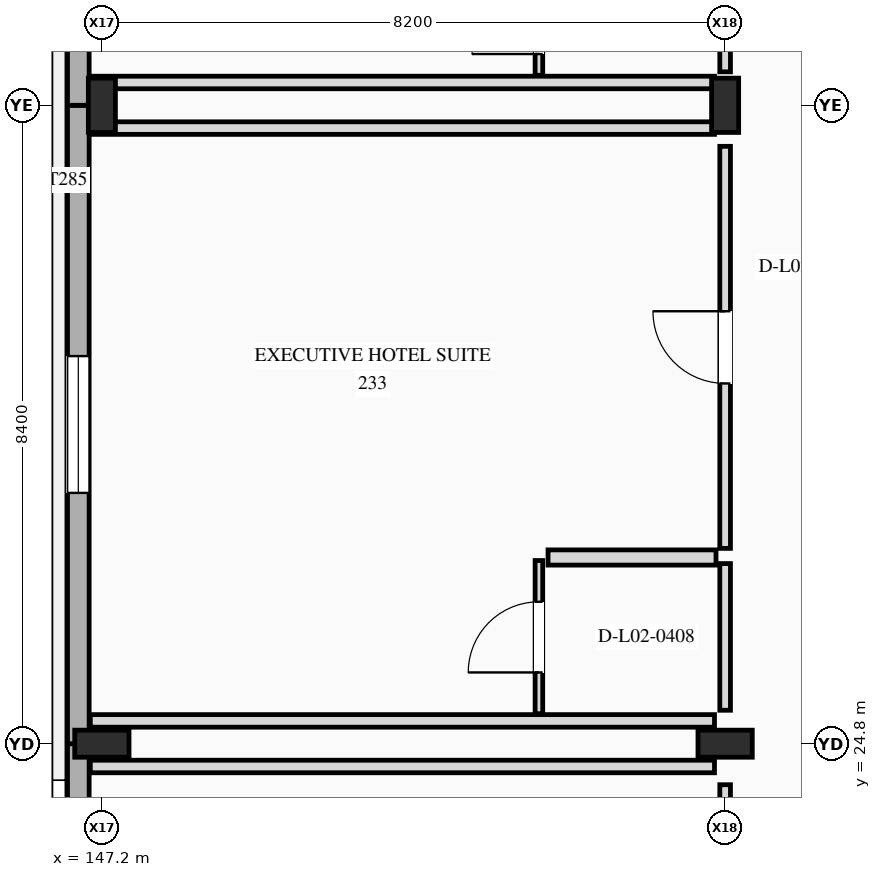
"""IFC4 building model, lengths in metres.
Left out: names, types, materials, properties, quantities, classifications, styles, units other than length and angle.
Written with IfcOpenShell. Run it as: python <this file> out.ifc"""

import sys

from ifc_helpers import new_model, si_unit, direction, frame, frame_2d, origin, origin_2d, place, context, subcontext, project, spatial, rectangle, i_section, extrude, element, fill, save


model = new_model("IFC4")
c1 = context("Model", 3, precision=1e-05, world=origin(), true_north=direction((0.0, 1.0)))
c2 = subcontext(c1, "Body", "Model", "MODEL_VIEW")
j1 = project(units=[si_unit("LENGTHUNIT", "METRE"), si_unit("PLANEANGLEUNIT", "RADIAN")], contexts=[c1])
p1 = place(None, origin())
s1 = spatial("IfcSite", under=j1, at=p1, CompositionType="ELEMENT")
p2 = place(p1, origin())
s2 = spatial("IfcBuilding", under=s1, at=p2, CompositionType="ELEMENT")
p3 = place(p2, frame((0.0, 0.0, 10.8)))
s3 = spatial("IfcBuildingStorey", under=s2, at=p3, CompositionType="ELEMENT", Elevation=10.8)
for number, where, z_axis, x_axis in (
    (1, (147.2, 24.8, 0.0), (0.0, 0.0, 1.0), (0.0, 1.0, 0.0)),
    (2, (147.2, 33.2, 0.0), (0.0, 0.0, 1.0), (1.0, 0.0, 0.0)),
    (3, (155.4, 24.8, 0.0), (0.0, 0.0, 1.0), (0.0, 1.0, 0.0)),
    (4, (155.4, 33.2, 0.0), (0.0, 0.0, 1.0), (1.0, 0.0, 0.0)),
):
    element("IfcColumn", number, at=place(p3, frame(where, z_axis=z_axis, x_axis=x_axis)), inside=s3, PredefinedType="COLUMN", context=c2, shape_type="SweptSolid", body=[
        extrude(i_section(OverallWidth=0.356, OverallDepth=0.714, WebThickness=0.019, FlangeThickness=0.034, at=origin_2d()), origin(), (0.0, 0.0, 1.0), 4.8),
    ])
p4 = place(p3, frame((146.89, 19.254, 0.0), z_axis=(0.0, 0.0, 1.0), x_axis=(0.0, 1.0, 0.0)))
e5 = element("IfcWall", 5, at=p4, inside=s3, PredefinedType="STANDARD", context=c2, shape_type="SweptSolid", body=[
    extrude(rectangle(XDim=5.546, YDim=0.285, at=frame_2d((2.773, 0.0))), origin(), (0.0, 0.0, 1.0), 4.8),
])
p5 = place(p4, frame((2.048, 0.0, 0.85)))
e6 = element("IfcOpeningElement", 6, at=p5, cuts=e5, PredefinedType="OPENING", context=c2, shape_type="SweptSolid", body=[
    extrude(rectangle(XDim=1.1, YDim=1.5, at=frame_2d((0.55, 0.75))), frame((0.0, 0.152, 0.0), z_axis=(0.0, -1.0, 0.0), x_axis=(1.0, 0.0, 0.0)), (0.0, 0.0, 1.0), 0.305),
])
p6 = place(p3, frame((146.89, 24.8, 0.0), z_axis=(0.0, 0.0, 1.0), x_axis=(0.0, 1.0, 0.0)))
e7 = element("IfcWall", 7, at=p6, inside=s3, PredefinedType="STANDARD", context=c2, shape_type="SweptSolid", body=[
    extrude(rectangle(XDim=8.4, YDim=0.285, at=frame_2d((4.2, 0.0))), origin(), (0.0, 0.0, 1.0), 4.8),
])
p7 = place(p6, frame((3.3, 0.0, 0.85)))
e8 = element("IfcOpeningElement", 8, at=p7, cuts=e7, PredefinedType="OPENING", context=c2, shape_type="SweptSolid", body=[
    extrude(rectangle(XDim=1.8, YDim=1.8, at=frame_2d((0.9, 0.9))), frame((0.0, 0.152, 0.0), z_axis=(0.0, -1.0, 0.0), x_axis=(1.0, 0.0, 0.0)), (0.0, 0.0, 1.0), 0.305),
])
p8 = place(p3, frame((146.89, 33.2, 0.0), z_axis=(0.0, 0.0, 1.0), x_axis=(0.0, 1.0, 0.0)))
e9 = element("IfcWall", 9, at=p8, inside=s3, PredefinedType="STANDARD", context=c2, shape_type="SweptSolid", body=[
    extrude(rectangle(XDim=8.4, YDim=0.285, at=frame_2d((4.2, 0.0))), origin(), (0.0, 0.0, 1.0), 4.8),
])
p9 = place(p3, frame((155.4, 21.37, 0.0), z_axis=(0.0, 0.0, 1.0), x_axis=(0.0, 1.0, 0.0)))
e10 = element("IfcWall", 10, at=p9, inside=s3, PredefinedType="PARTITIONING", context=c2, shape_type="SweptSolid", body=[
    extrude(rectangle(XDim=2.89, YDim=0.14, at=frame_2d((1.445, 0.0))), origin(), (0.0, 0.0, 1.0), 3.949),
])
p10 = place(p9, frame((0.91, 0.0, 0.0)))
e11 = element("IfcOpeningElement", 11, at=p10, cuts=e10, PredefinedType="OPENING", context=c2, shape_type="SweptSolid", body=[
    extrude(rectangle(XDim=1.07, YDim=2.4, at=frame_2d((0.535, 1.2))), frame((0.0, 0.08, 0.0), z_axis=(0.0, -1.0, 0.0), x_axis=(1.0, 0.0, 0.0)), (0.0, 0.0, 1.0), 0.16),
])
p11 = place(p3, frame((147.048, 24.5, 0.0), z_axis=(0.0, 0.0, 1.0), x_axis=(1.0, 0.0, 0.0)))
e12 = element("IfcWall", 12, at=p11, inside=s3, PredefinedType="PARTITIONING", context=c2, shape_type="SweptSolid", body=[
    extrude(rectangle(XDim=8.212, YDim=0.165, at=frame_2d((4.106, 0.0))), origin(), (0.0, 0.0, 1.0), 3.888),
])
p12 = place(p3, frame((155.4, 25.24, 0.0), z_axis=(0.0, 0.0, 1.0), x_axis=(0.0, 1.0, 0.0)))
e13 = element("IfcWall", 13, at=p12, inside=s3, PredefinedType="PARTITIONING", context=c2, shape_type="SweptSolid", body=[
    extrude(rectangle(XDim=1.93, YDim=0.14, at=frame_2d((0.965, 0.0))), origin(), (0.0, 0.0, 1.0), 3.949),
])
p13 = place(p3, frame((155.4, 27.37, 0.0), z_axis=(0.0, 0.0, 1.0), x_axis=(0.0, 1.0, 0.0)))
e14 = element("IfcWall", 14, at=p13, inside=s3, PredefinedType="PARTITIONING", context=c2, shape_type="SweptSolid", body=[
    extrude(rectangle(XDim=5.29, YDim=0.14, at=frame_2d((2.645, 0.0))), origin(), (0.0, 0.0, 1.0), 3.949),
])
p14 = place(p13, frame((2.17, 0.0, 0.0)))
e15 = element("IfcOpeningElement", 15, at=p14, cuts=e14, PredefinedType="OPENING", context=c2, shape_type="SweptSolid", body=[
    extrude(rectangle(XDim=0.95, YDim=2.15, at=frame_2d((0.475, 1.075))), frame((0.0, 0.08, 0.0), z_axis=(0.0, -1.0, 0.0), x_axis=(1.0, 0.0, 0.0)), (0.0, 0.0, 1.0), 0.16),
])
for number, where, z_axis, x_axis in (
    (16, (147.048, 25.1, 0.0), (0.0, 0.0, 1.0), (1.0, 0.0, 0.0)),
    (17, (147.048, 32.9, 0.0), (0.0, 0.0, 1.0), (1.0, 0.0, 0.0)),
):
    element("IfcWall", number, at=place(p3, frame(where, z_axis=z_axis, x_axis=x_axis)), inside=s3, PredefinedType="PARTITIONING", context=c2, shape_type="SweptSolid", body=[
        extrude(rectangle(XDim=8.212, YDim=0.165, at=frame_2d((4.106, 0.0))), origin(), (0.0, 0.0, 1.0), 3.888),
    ])
p15 = place(p3, frame((153.07, 27.25, 0.0), z_axis=(0.0, 0.0, 1.0), x_axis=(1.0, 0.0, 0.0)))
e18 = element("IfcWall", 18, at=p15, inside=s3, PredefinedType="PLUMBINGWALL", context=c2, shape_type="SweptSolid", body=[
    extrude(rectangle(XDim=2.21, YDim=0.2, at=frame_2d((1.105, 0.0))), origin(), (0.0, 0.0, 1.0), 4.475),
])
p16 = place(p3, frame((152.95, 25.195, 0.0), z_axis=(0.0, 0.0, 1.0), x_axis=(0.0, 1.0, 0.0)))
e19 = element("IfcWall", 19, at=p16, inside=s3, PredefinedType="PARTITIONING", context=c2, shape_type="SweptSolid", body=[
    extrude(rectangle(XDim=2.015, YDim=0.1, at=frame_2d((1.008, 0.0))), origin(), (0.0, 0.0, 1.0), 4.083),
])
p17 = place(p16, frame((0.543, 0.0, 0.0)))
e20 = element("IfcOpeningElement", 20, at=p17, cuts=e19, PredefinedType="OPENING", context=c2, shape_type="SweptSolid", body=[
    extrude(rectangle(XDim=0.93, YDim=2.14, at=frame_2d((0.465, 1.07))), frame((0.0, 0.06, 0.0), z_axis=(0.0, -1.0, 0.0), x_axis=(1.0, 0.0, 0.0)), (0.0, 0.0, 1.0), 0.12),
])
p18 = place(p3, frame((155.4, 33.64, 0.0), z_axis=(0.0, 0.0, 1.0), x_axis=(0.0, 1.0, 0.0)))
e21 = element("IfcWall", 21, at=p18, inside=s3, PredefinedType="PARTITIONING", context=c2, shape_type="SweptSolid", body=[
    extrude(rectangle(XDim=1.355, YDim=0.14, at=frame_2d((0.678, 0.0))), origin(), (0.0, 0.0, 1.0), 3.865),
])
p19 = place(p3, frame((147.048, 33.5, 0.0), z_axis=(0.0, 0.0, 1.0), x_axis=(1.0, 0.0, 0.0)))
e22 = element("IfcWall", 22, at=p19, inside=s3, PredefinedType="PARTITIONING", context=c2, shape_type="SweptSolid", body=[
    extrude(rectangle(XDim=8.212, YDim=0.165, at=frame_2d((4.106, 0.0))), origin(), (0.0, 0.0, 1.0), 3.888),
])
p20 = place(p3, frame((152.95, 33.594, 0.0), z_axis=(0.0, 0.0, 1.0), x_axis=(0.0, 1.0, 0.0)))
e23 = element("IfcWall", 23, at=p20, inside=s3, PredefinedType="PARTITIONING", context=c2, shape_type="SweptSolid", body=[
    extrude(rectangle(XDim=1.44, YDim=0.1, at=frame_2d((0.72, 0.0))), origin(), (0.0, 0.0, 1.0), 4.475),
])
p21 = place(p20, frame((0.28, 0.0, 0.0)))
e24 = element("IfcOpeningElement", 24, at=p21, cuts=e23, PredefinedType="OPENING", context=c2, shape_type="SweptSolid", body=[
    extrude(rectangle(XDim=0.88, YDim=2.18, at=frame_2d((0.44, 1.09))), frame((0.0, 0.06, 0.0), z_axis=(0.0, -1.0, 0.0), x_axis=(1.0, 0.0, 0.0)), (0.0, 0.0, 1.0), 0.12),
])
p22 = place(p7, origin())
e25 = element("IfcWindow", 25, at=p22, inside=s3, PartitioningType="SINGLE_PANEL", PredefinedType="WINDOW", context=c2, shape_type="SweptSolid", body=[
    extrude(rectangle(XDim=1.8, YDim=1.8, at=frame_2d((0.9, 0.9))), frame((0.0, 0.03, 0.0), z_axis=(0.0, -1.0, 0.0), x_axis=(1.0, 0.0, 0.0)), (0.0, 0.0, 1.0), 0.06),
])
fill(e8, e25)
p23 = place(p14, origin())
e26 = element("IfcDoor", 26, at=p23, inside=s3, OperationType="SINGLE_SWING_RIGHT", PredefinedType="DOOR", context=c2, shape_type="SweptSolid", body=[
    extrude(rectangle(XDim=0.95, YDim=2.15, at=frame_2d((0.475, 1.075))), frame((0.0, 0.025, 0.0), z_axis=(0.0, -1.0, 0.0), x_axis=(1.0, 0.0, 0.0)), (0.0, 0.0, 1.0), 0.05),
])
fill(e15, e26)
p24 = place(p17, origin())
e27 = element("IfcDoor", 27, at=p24, inside=s3, OperationType="SINGLE_SWING_LEFT", PredefinedType="DOOR", context=c2, shape_type="SweptSolid", body=[
    extrude(rectangle(XDim=0.93, YDim=2.14, at=frame_2d((0.465, 1.07))), frame((0.0, 0.025, 0.0), z_axis=(0.0, -1.0, 0.0), x_axis=(1.0, 0.0, 0.0)), (0.0, 0.0, 1.0), 0.05),
])
fill(e20, e27)
p25 = place(p21, origin())
e28 = element("IfcDoor", 28, at=p25, inside=s3, OperationType="SINGLE_SWING_LEFT", PredefinedType="DOOR", context=c2, shape_type="SweptSolid", body=[
    extrude(rectangle(XDim=0.88, YDim=2.18, at=frame_2d((0.44, 1.09))), frame((0.0, 0.025, 0.0), z_axis=(0.0, -1.0, 0.0), x_axis=(1.0, 0.0, 0.0)), (0.0, 0.0, 1.0), 0.05),
])
fill(e24, e28)
save(model, sys.argv[1])
